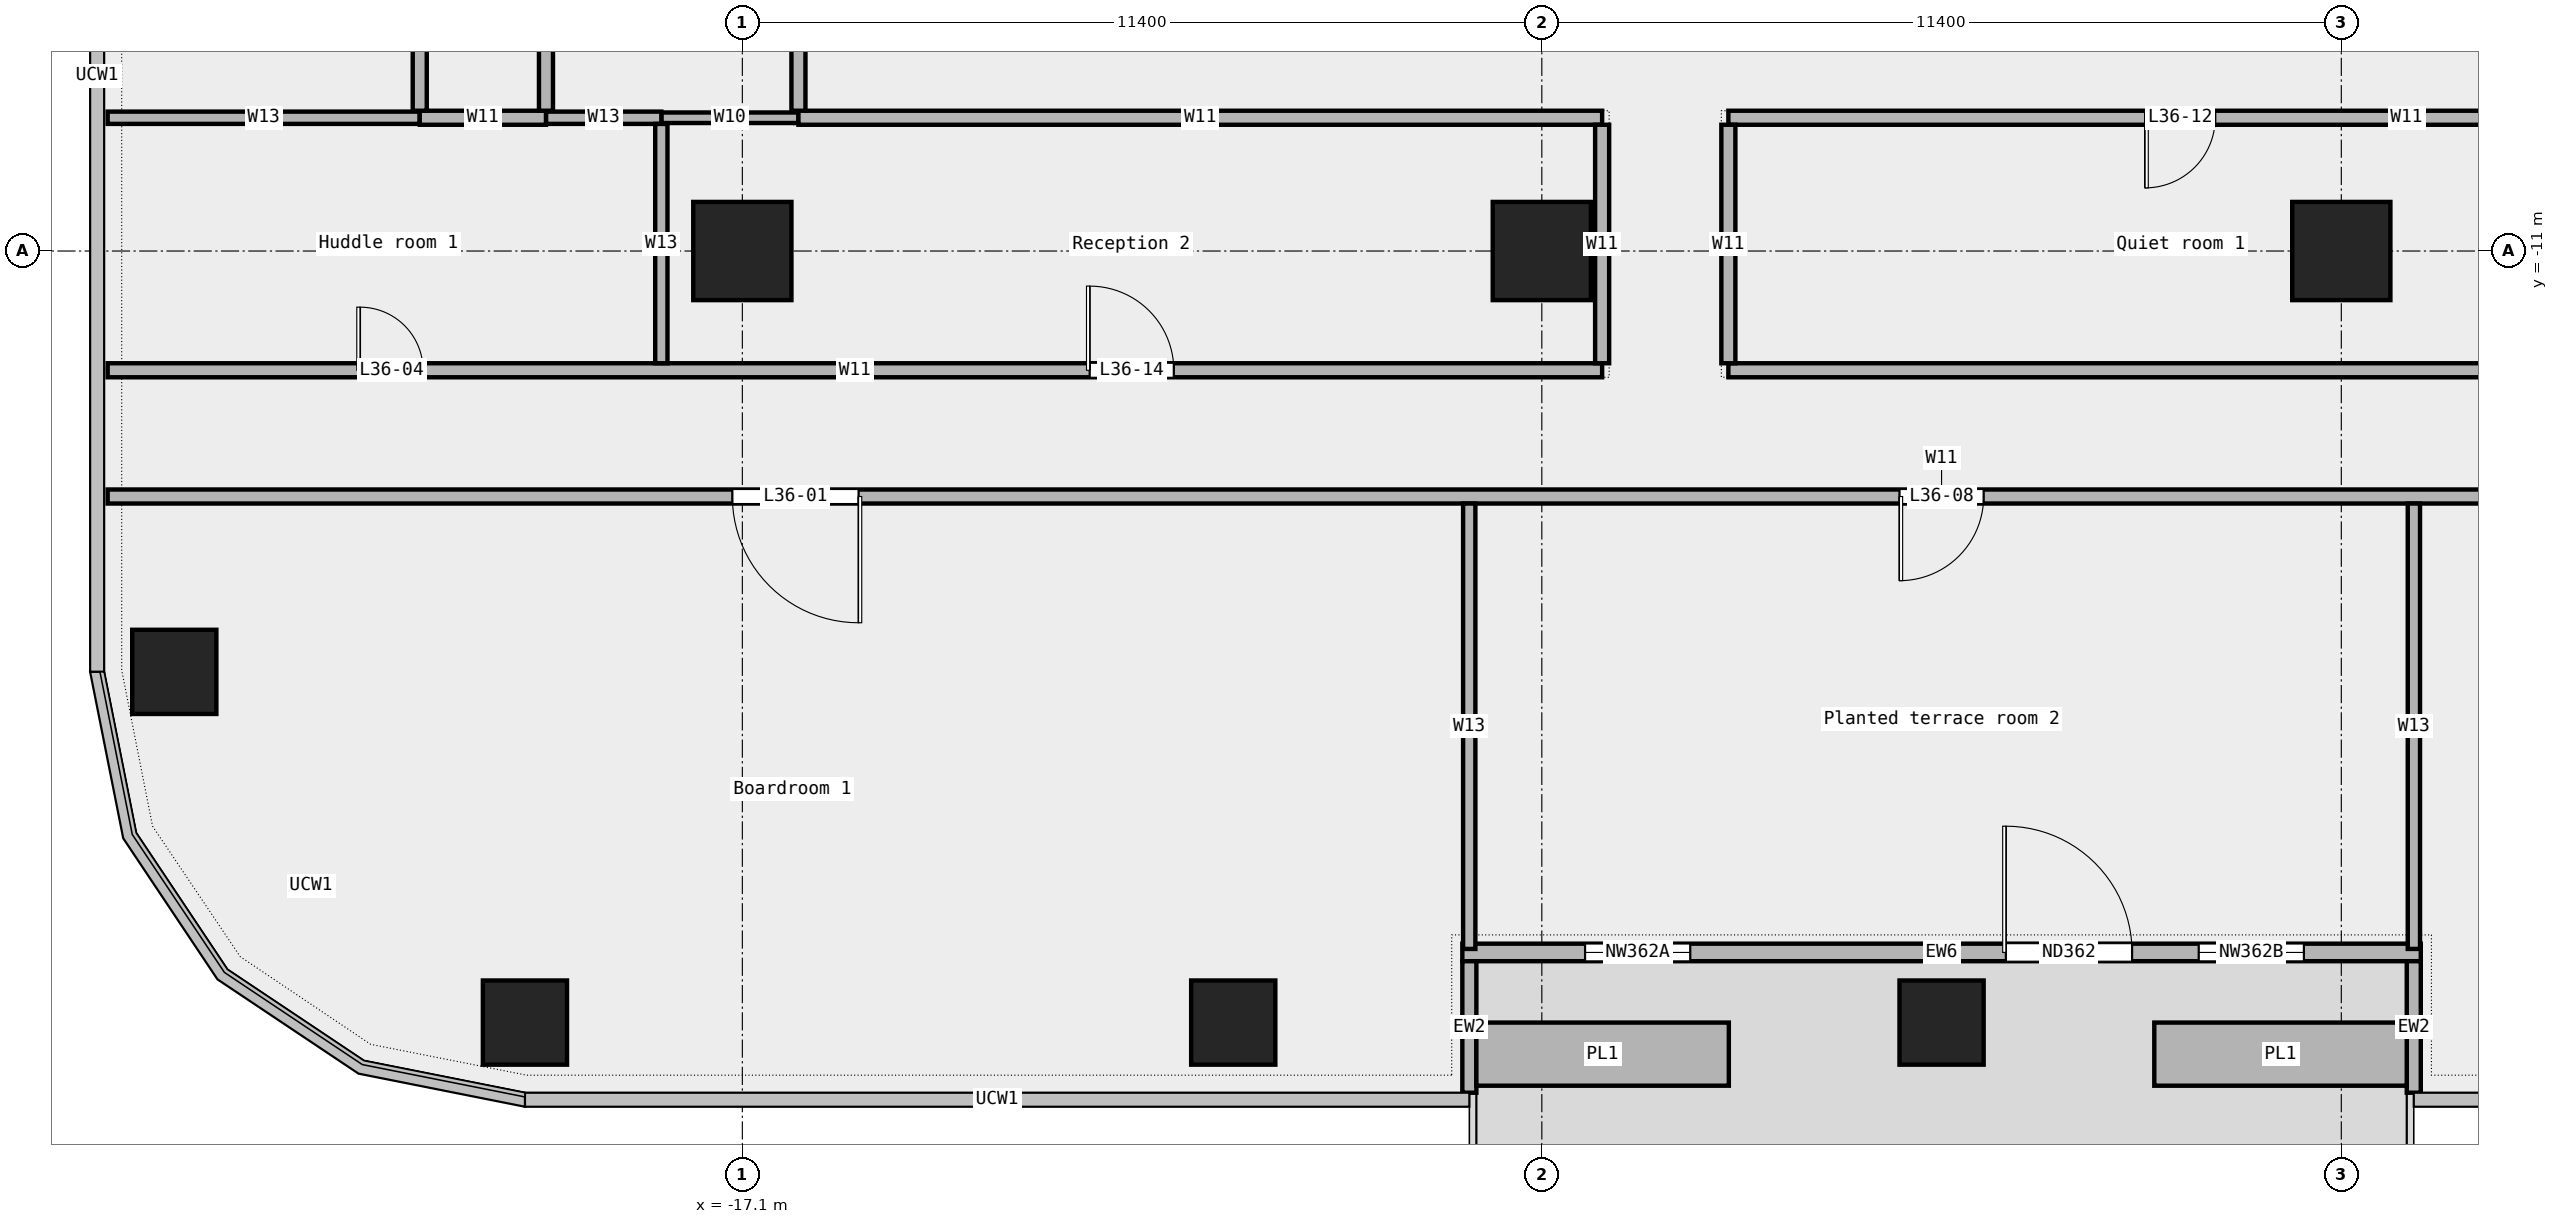
"""IFC4 building model, lengths in metres.
Left out: names, types, materials, properties, quantities, classifications, styles, units other than length and angle.
Written with IfcOpenShell. Run it as: python <this file> out.ifc"""

import sys

from ifc_helpers import new_model, si_unit, direction, frame, frame_2d, origin, origin_2d, place, context, subcontext, project, spatial, rectangle, extrude, element, fill, save


model = new_model("IFC4")
c1 = context("Model", 3, precision=1e-05, world=origin(), true_north=direction((0.0, 1.0)))
c2 = subcontext(c1, "Body", "Model", "MODEL_VIEW")
j1 = project(units=[si_unit("LENGTHUNIT", "METRE"), si_unit("PLANEANGLEUNIT", "RADIAN")], contexts=[c1])
p1 = place(None, origin())
s1 = spatial("IfcSite", under=j1, at=p1, CompositionType="ELEMENT")
p2 = place(p1, origin())
s2 = spatial("IfcBuilding", under=s1, at=p2, CompositionType="ELEMENT")
p3 = place(p2, frame((0.0, 0.0, 177.0)))
s3 = spatial("IfcBuildingStorey", under=s2, at=p3, CompositionType="ELEMENT", Elevation=177.0)
for number, where, z_axis, x_axis in (
    (1, (-20.2, -22.0, 0.0), (0.0, 0.0, 1.0), (1.0, 0.0, 0.0)),
    (2, (-10.1, -22.0, 0.0), (0.0, 0.0, 1.0), (1.0, 0.0, 0.0)),
    (3, (0.0, -22.0, 0.0), (0.0, 0.0, 1.0), (1.0, 0.0, 0.0)),
    (4, (-25.2, -17.0, 0.0), (0.0, 0.0, 1.0), (1.0, 0.0, 0.0)),
):
    element("IfcColumn", number, at=place(p3, frame(where, z_axis=z_axis, x_axis=x_axis)), inside=s3, PredefinedType="COLUMN", context=c2, shape_type="SweptSolid", body=[
        extrude(rectangle(XDim=1.2, YDim=1.2, at=origin_2d()), origin(), (0.0, 0.0, 1.0), 3.6),
    ])
for number, where, z_axis, x_axis in (
    (5, (-17.1, -11.0, 0.0), (0.0, 0.0, 1.0), (1.0, 0.0, 0.0)),
    (6, (-5.7, -11.0, 0.0), (0.0, 0.0, 1.0), (1.0, 0.0, 0.0)),
    (7, (5.7, -11.0, 0.0), (0.0, 0.0, 1.0), (1.0, 0.0, 0.0)),
):
    element("IfcColumn", number, at=place(p3, frame(where, z_axis=z_axis, x_axis=x_axis)), inside=s3, PredefinedType="COLUMN", context=c2, shape_type="SweptSolid", body=[
        extrude(rectangle(XDim=1.4, YDim=1.4, at=origin_2d()), origin(), (0.0, 0.0, 1.0), 3.6),
    ])
p4 = place(p3, frame((-6.833, -21.0, 0.0), z_axis=(0.0, 0.0, 1.0), x_axis=(1.0, 0.0, 0.0)))
e8 = element("IfcWall", 8, at=p4, inside=s3, PredefinedType="STANDARD", context=c2, shape_type="SweptSolid", body=[
    extrude(rectangle(XDim=13.667, YDim=0.25, at=frame_2d((6.833, 0.0))), origin(), (0.0, 0.0, 1.0), 3.6),
])
p5 = place(p4, frame((1.75, 0.0, 0.45)))
e9 = element("IfcOpeningElement", 9, at=p5, cuts=e8, PredefinedType="OPENING", context=c2, shape_type="SweptSolid", body=[
    extrude(rectangle(XDim=1.5, YDim=2.4, at=frame_2d((0.75, 1.2))), frame((0.0, 0.137, 0.0), z_axis=(0.0, -1.0, 0.0), x_axis=(1.0, 0.0, 0.0)), (0.0, 0.0, 1.0), 0.274),
])
p6 = place(p4, frame((7.75, 0.0, 0.0)))
e10 = element("IfcOpeningElement", 10, at=p6, cuts=e8, PredefinedType="OPENING", context=c2, shape_type="SweptSolid", body=[
    extrude(rectangle(XDim=1.8, YDim=2.4, at=frame_2d((0.9, 1.2))), frame((0.0, 0.137, 0.0), z_axis=(0.0, -1.0, 0.0), x_axis=(1.0, 0.0, 0.0)), (0.0, 0.0, 1.0), 0.274),
])
p7 = place(p4, frame((10.5, 0.0, 0.45)))
e11 = element("IfcOpeningElement", 11, at=p7, cuts=e8, PredefinedType="OPENING", context=c2, shape_type="SweptSolid", body=[
    extrude(rectangle(XDim=1.5, YDim=2.4, at=frame_2d((0.75, 1.2))), frame((0.0, 0.137, 0.0), z_axis=(0.0, -1.0, 0.0), x_axis=(1.0, 0.0, 0.0)), (0.0, 0.0, 1.0), 0.274),
])
for number, where, z_axis, x_axis in (
    (12, (-6.733, -23.0, 0.0), (0.0, 0.0, 1.0), (0.0, 1.0, 0.0)),
    (13, (6.733, -23.0, 0.0), (0.0, 0.0, 1.0), (0.0, 1.0, 0.0)),
):
    element("IfcWall", number, at=place(p3, frame(where, z_axis=z_axis, x_axis=x_axis)), inside=s3, PredefinedType="STANDARD", context=c2, shape_type="SweptSolid", body=[
        extrude(rectangle(XDim=1.875, YDim=0.2, at=frame_2d((0.938, 0.0))), origin(), (0.0, 0.0, 1.0), 3.6),
    ])
for number, where, z_axis, x_axis in (
    (14, (-6.633, -22.45, 0.0), (0.0, 0.0, 1.0), (1.0, 0.0, 0.0)),
    (15, (3.033, -22.45, 0.0), (0.0, 0.0, 1.0), (1.0, 0.0, 0.0)),
):
    element("IfcWall", number, at=place(p3, frame(where, z_axis=z_axis, x_axis=x_axis)), inside=s3, PredefinedType="STANDARD", context=c2, shape_type="SweptSolid", body=[
        extrude(rectangle(XDim=3.6, YDim=0.9, at=frame_2d((1.8, 0.0))), origin(), (0.0, 0.0, 1.0), 0.7),
    ])
p8 = place(p3, frame((-26.15, -14.5, 0.0), z_axis=(0.0, 0.0, 1.0), x_axis=(1.0, 0.0, 0.0)))
e16 = element("IfcWall", 16, at=p8, inside=s3, PredefinedType="PARTITIONING", context=c2, shape_type="SweptSolid", body=[
    extrude(rectangle(XDim=52.3, YDim=0.2, at=frame_2d((26.15, 0.0))), origin(), (0.0, 0.0, 1.0), 3.6),
])
p9 = place(p8, frame((8.907, 0.0, 0.0)))
e17 = element("IfcOpeningElement", 17, at=p9, cuts=e16, PredefinedType="OPENING", context=c2, shape_type="SweptSolid", body=[
    extrude(rectangle(XDim=1.8, YDim=2.1, at=frame_2d((0.9, 1.05))), frame((0.0, 0.112, 0.0), z_axis=(0.0, -1.0, 0.0), x_axis=(1.0, 0.0, 0.0)), (0.0, 0.0, 1.0), 0.224),
])
p10 = place(p8, frame((25.55, 0.0, 0.0)))
e18 = element("IfcOpeningElement", 18, at=p10, cuts=e16, PredefinedType="OPENING", context=c2, shape_type="SweptSolid", body=[
    extrude(rectangle(XDim=1.2, YDim=2.1, at=frame_2d((0.6, 1.05))), frame((0.0, 0.112, 0.0), z_axis=(0.0, -1.0, 0.0), x_axis=(1.0, 0.0, 0.0)), (0.0, 0.0, 1.0), 0.224),
])
p11 = place(p8, frame((41.593, 0.0, 0.0)))
e19 = element("IfcOpeningElement", 19, at=p11, cuts=e16, PredefinedType="OPENING", context=c2, shape_type="SweptSolid", body=[
    extrude(rectangle(XDim=1.8, YDim=2.1, at=frame_2d((0.9, 1.05))), frame((0.0, 0.112, 0.0), z_axis=(0.0, -1.0, 0.0), x_axis=(1.0, 0.0, 0.0)), (0.0, 0.0, 1.0), 0.224),
])
p12 = place(p3, frame((-26.15, -12.7, 0.0), z_axis=(0.0, 0.0, 1.0), x_axis=(1.0, 0.0, 0.0)))
e20 = element("IfcWall", 20, at=p12, inside=s3, PredefinedType="PARTITIONING", context=c2, shape_type="SweptSolid", body=[
    extrude(rectangle(XDim=21.31, YDim=0.2, at=frame_2d((10.655, 0.0))), origin(), (0.0, 0.0, 1.0), 3.6),
])
p13 = place(p12, frame((3.597, 0.0, 0.0)))
e21 = element("IfcOpeningElement", 21, at=p13, cuts=e20, PredefinedType="OPENING", context=c2, shape_type="SweptSolid", body=[
    extrude(rectangle(XDim=0.9, YDim=2.1, at=frame_2d((0.45, 1.05))), frame((0.0, 0.112, 0.0), z_axis=(0.0, -1.0, 0.0), x_axis=(1.0, 0.0, 0.0)), (0.0, 0.0, 1.0), 0.224),
])
p14 = place(p12, frame((14.002, 0.0, 0.0)))
e22 = element("IfcOpeningElement", 22, at=p14, cuts=e20, PredefinedType="OPENING", context=c2, shape_type="SweptSolid", body=[
    extrude(rectangle(XDim=1.2, YDim=2.1, at=frame_2d((0.6, 1.05))), frame((0.0, 0.112, 0.0), z_axis=(0.0, -1.0, 0.0), x_axis=(1.0, 0.0, 0.0)), (0.0, 0.0, 1.0), 0.224),
])
p15 = place(p3, frame((-3.04, -12.7, 0.0), z_axis=(0.0, 0.0, 1.0), x_axis=(1.0, 0.0, 0.0)))
e23 = element("IfcWall", 23, at=p15, inside=s3, PredefinedType="PARTITIONING", context=c2, shape_type="SweptSolid", body=[
    extrude(rectangle(XDim=29.19, YDim=0.2, at=frame_2d((14.595, 0.0))), origin(), (0.0, 0.0, 1.0), 3.6),
])
p16 = place(p15, frame((20.938, 0.0, 0.0)))
e24 = element("IfcOpeningElement", 24, at=p16, cuts=e23, PredefinedType="OPENING", context=c2, shape_type="SweptSolid", body=[
    extrude(rectangle(XDim=1.2, YDim=2.1, at=frame_2d((0.6, 1.05))), frame((0.0, 0.112, 0.0), z_axis=(0.0, -1.0, 0.0), x_axis=(1.0, 0.0, 0.0)), (0.0, 0.0, 1.0), 0.224),
])
p17 = place(p3, frame((-18.255, -9.1, 0.0), z_axis=(0.0, 0.0, 1.0), x_axis=(1.0, 0.0, 0.0)))
e25 = element("IfcWall", 25, at=p17, inside=s3, PredefinedType="PARTITIONING", context=c2, shape_type="SweptSolid", body=[
    extrude(rectangle(XDim=1.955, YDim=0.15, at=frame_2d((0.978, 0.0))), origin(), (0.0, 0.0, 1.0), 3.6),
])
p18 = place(p3, frame((-26.15, -9.1, 0.0), z_axis=(0.0, 0.0, 1.0), x_axis=(1.0, 0.0, 0.0)))
e26 = element("IfcWall", 26, at=p18, inside=s3, PredefinedType="PARTITIONING", context=c2, shape_type="SweptSolid", body=[
    extrude(rectangle(XDim=4.45, YDim=0.175, at=frame_2d((2.225, 0.0))), origin(), (0.0, 0.0, 1.0), 3.6),
])
p19 = place(p3, frame((-19.9, -9.1, 0.0), z_axis=(0.0, 0.0, 1.0), x_axis=(1.0, 0.0, 0.0)))
e27 = element("IfcWall", 27, at=p19, inside=s3, PredefinedType="PARTITIONING", context=c2, shape_type="SweptSolid", body=[
    extrude(rectangle(XDim=1.645, YDim=0.175, at=frame_2d((0.823, 0.0))), origin(), (0.0, 0.0, 1.0), 3.6),
])
p20 = place(p3, frame((-21.7, -9.1, 0.0), z_axis=(0.0, 0.0, 1.0), x_axis=(1.0, 0.0, 0.0)))
e28 = element("IfcWall", 28, at=p20, inside=s3, PredefinedType="PARTITIONING", context=c2, shape_type="SweptSolid", body=[
    extrude(rectangle(XDim=1.8, YDim=0.2, at=frame_2d((0.9, 0.0))), origin(), (0.0, 0.0, 1.0), 3.6),
])
p21 = place(p3, frame((-16.3, -9.1, 0.0), z_axis=(0.0, 0.0, 1.0), x_axis=(1.0, 0.0, 0.0)))
e29 = element("IfcWall", 29, at=p21, inside=s3, PredefinedType="PARTITIONING", context=c2, shape_type="SweptSolid", body=[
    extrude(rectangle(XDim=11.46, YDim=0.2, at=frame_2d((5.73, 0.0))), origin(), (0.0, 0.0, 1.0), 3.6),
])
p22 = place(p3, frame((-3.04, -9.1, 0.0), z_axis=(0.0, 0.0, 1.0), x_axis=(1.0, 0.0, 0.0)))
e30 = element("IfcWall", 30, at=p22, inside=s3, PredefinedType="PARTITIONING", context=c2, shape_type="SweptSolid", body=[
    extrude(rectangle(XDim=19.34, YDim=0.2, at=frame_2d((9.67, 0.0))), origin(), (0.0, 0.0, 1.0), 3.6),
])
p23 = place(p22, frame((5.942, 0.0, 0.0)))
e31 = element("IfcOpeningElement", 31, at=p23, cuts=e30, PredefinedType="OPENING", context=c2, shape_type="SweptSolid", body=[
    extrude(rectangle(XDim=1.0, YDim=2.1, at=frame_2d((0.5, 1.05))), frame((0.0, 0.112, 0.0), z_axis=(0.0, -1.0, 0.0), x_axis=(1.0, 0.0, 0.0)), (0.0, 0.0, 1.0), 0.224),
])
p24 = place(p3, frame((-21.7, -9.0, 0.0), z_axis=(0.0, 0.0, 1.0), x_axis=(0.0, 1.0, 0.0)))
e32 = element("IfcWall", 32, at=p24, inside=s3, PredefinedType="PARTITIONING", context=c2, shape_type="SweptSolid", body=[
    extrude(rectangle(XDim=24.3, YDim=0.2, at=frame_2d((12.15, 0.0))), origin(), (0.0, 0.0, 1.0), 3.6),
])
p25 = place(p24, frame((14.925, 0.0, 0.0)))
e33 = element("IfcOpeningElement", 33, at=p25, cuts=e32, PredefinedType="OPENING", context=c2, shape_type="SweptSolid", body=[
    extrude(rectangle(XDim=0.9, YDim=2.1, at=frame_2d((0.45, 1.05))), frame((0.0, 0.112, 0.0), z_axis=(0.0, -1.0, 0.0), x_axis=(1.0, 0.0, 0.0)), (0.0, 0.0, 1.0), 0.224),
])
p26 = place(p24, frame((2.562, 0.0, 0.0)))
e34 = element("IfcOpeningElement", 34, at=p26, cuts=e32, PredefinedType="OPENING", context=c2, shape_type="SweptSolid", body=[
    extrude(rectangle(XDim=0.9, YDim=2.1, at=frame_2d((0.45, 1.05))), frame((0.0, 0.112, 0.0), z_axis=(0.0, -1.0, 0.0), x_axis=(1.0, 0.0, 0.0)), (0.0, 0.0, 1.0), 0.224),
])
p27 = place(p3, frame((-19.9, -9.0, 0.0), z_axis=(0.0, 0.0, 1.0), x_axis=(0.0, 1.0, 0.0)))
e35 = element("IfcWall", 35, at=p27, inside=s3, PredefinedType="PARTITIONING", context=c2, shape_type="SweptSolid", body=[
    extrude(rectangle(XDim=13.6, YDim=0.2, at=frame_2d((6.8, 0.0))), origin(), (0.0, 0.0, 1.0), 3.6),
])
p28 = place(p3, frame((-18.255, -12.6, 0.0), z_axis=(0.0, 0.0, 1.0), x_axis=(0.0, 1.0, 0.0)))
e36 = element("IfcWall", 36, at=p28, inside=s3, PredefinedType="PARTITIONING", context=c2, shape_type="SweptSolid", body=[
    extrude(rectangle(XDim=3.412, YDim=0.175, at=frame_2d((1.706, 0.0))), origin(), (0.0, 0.0, 1.0), 3.6),
])
p29 = place(p3, frame((-16.3, -9.0, 0.0), z_axis=(0.0, 0.0, 1.0), x_axis=(0.0, 1.0, 0.0)))
e37 = element("IfcWall", 37, at=p29, inside=s3, PredefinedType="PARTITIONING", context=c2, shape_type="SweptSolid", body=[
    extrude(rectangle(XDim=8.3, YDim=0.2, at=frame_2d((4.15, 0.0))), origin(), (0.0, 0.0, 1.0), 3.6),
])
p30 = place(p29, frame((3.442, 0.0, 0.0)))
e38 = element("IfcOpeningElement", 38, at=p30, cuts=e37, PredefinedType="OPENING", context=c2, shape_type="SweptSolid", body=[
    extrude(rectangle(XDim=0.9, YDim=2.1, at=frame_2d((0.45, 1.05))), frame((0.0, 0.112, 0.0), z_axis=(0.0, -1.0, 0.0), x_axis=(1.0, 0.0, 0.0)), (0.0, 0.0, 1.0), 0.224),
])
p31 = place(p3, frame((-6.735, -20.95, 0.0), z_axis=(0.0, 0.0, 1.0), x_axis=(0.0, 1.0, 0.0)))
e39 = element("IfcWall", 39, at=p31, inside=s3, PredefinedType="PARTITIONING", context=c2, shape_type="SweptSolid", body=[
    extrude(rectangle(XDim=6.35, YDim=0.175, at=frame_2d((3.175, 0.0))), origin(), (0.0, 0.0, 1.0), 3.6),
])
for number, where, z_axis, x_axis in (
    (40, (-4.84, -12.6, 0.0), (0.0, 0.0, 1.0), (0.0, 1.0, 0.0)),
    (41, (-3.04, -12.6, 0.0), (0.0, 0.0, 1.0), (0.0, 1.0, 0.0)),
):
    element("IfcWall", number, at=place(p3, frame(where, z_axis=z_axis, x_axis=x_axis)), inside=s3, PredefinedType="PARTITIONING", context=c2, shape_type="SweptSolid", body=[
        extrude(rectangle(XDim=3.4, YDim=0.2, at=frame_2d((1.7, 0.0))), origin(), (0.0, 0.0, 1.0), 3.6),
    ])
p32 = place(p3, frame((6.735, -20.95, 0.0), z_axis=(0.0, 0.0, 1.0), x_axis=(0.0, 1.0, 0.0)))
e42 = element("IfcWall", 42, at=p32, inside=s3, PredefinedType="PARTITIONING", context=c2, shape_type="SweptSolid", body=[
    extrude(rectangle(XDim=6.35, YDim=0.175, at=frame_2d((3.175, 0.0))), origin(), (0.0, 0.0, 1.0), 3.6),
])
p33 = place(p5, origin())
e43 = element("IfcWindow", 43, at=p33, inside=s3, PartitioningType="SINGLE_PANEL", PredefinedType="WINDOW", context=c2, shape_type="SweptSolid", body=[
    extrude(rectangle(XDim=1.5, YDim=2.4, at=frame_2d((0.75, 1.2))), frame((0.0, 0.03, 0.0), z_axis=(0.0, -1.0, 0.0), x_axis=(1.0, 0.0, 0.0)), (0.0, 0.0, 1.0), 0.06),
])
fill(e9, e43)
p34 = place(p6, origin())
e44 = element("IfcDoor", 44, at=p34, inside=s3, OperationType="DOUBLE_DOOR_SINGLE_SWING", PredefinedType="DOOR", context=c2, shape_type="SweptSolid", body=[
    extrude(rectangle(XDim=1.8, YDim=2.4, at=frame_2d((0.9, 1.2))), frame((0.0, 0.025, 0.0), z_axis=(0.0, -1.0, 0.0), x_axis=(1.0, 0.0, 0.0)), (0.0, 0.0, 1.0), 0.05),
])
fill(e10, e44)
p35 = place(p7, origin())
e45 = element("IfcWindow", 45, at=p35, inside=s3, PartitioningType="SINGLE_PANEL", PredefinedType="WINDOW", context=c2, shape_type="SweptSolid", body=[
    extrude(rectangle(XDim=1.5, YDim=2.4, at=frame_2d((0.75, 1.2))), frame((0.0, 0.03, 0.0), z_axis=(0.0, -1.0, 0.0), x_axis=(1.0, 0.0, 0.0)), (0.0, 0.0, 1.0), 0.06),
])
fill(e11, e45)
p36 = place(p9, origin())
e46 = element("IfcDoor", 46, at=p36, inside=s3, OperationType="DOUBLE_DOOR_SINGLE_SWING", PredefinedType="DOOR", context=c2, shape_type="SweptSolid", body=[
    extrude(rectangle(XDim=1.8, YDim=2.1, at=frame_2d((0.9, 1.05))), frame((0.0, 0.025, 0.0), z_axis=(0.0, -1.0, 0.0), x_axis=(1.0, 0.0, 0.0)), (0.0, 0.0, 1.0), 0.05),
])
fill(e17, e46)
p37 = place(p13, origin())
e47 = element("IfcDoor", 47, at=p37, inside=s3, OperationType="SINGLE_SWING_LEFT", PredefinedType="DOOR", context=c2, shape_type="SweptSolid", body=[
    extrude(rectangle(XDim=0.9, YDim=2.1, at=frame_2d((0.45, 1.05))), frame((0.0, 0.025, 0.0), z_axis=(0.0, -1.0, 0.0), x_axis=(1.0, 0.0, 0.0)), (0.0, 0.0, 1.0), 0.05),
])
fill(e21, e47)
p38 = place(p10, origin())
e48 = element("IfcDoor", 48, at=p38, inside=s3, OperationType="SINGLE_SWING_RIGHT", PredefinedType="DOOR", context=c2, shape_type="SweptSolid", body=[
    extrude(rectangle(XDim=1.2, YDim=2.1, at=frame_2d((0.6, 1.05))), frame((0.0, 0.025, 0.0), z_axis=(0.0, -1.0, 0.0), x_axis=(1.0, 0.0, 0.0)), (0.0, 0.0, 1.0), 0.05),
])
fill(e18, e48)
p39 = place(p23, origin())
e49 = element("IfcDoor", 49, at=p39, inside=s3, OperationType="SINGLE_SWING_RIGHT", PredefinedType="DOOR", context=c2, shape_type="SweptSolid", body=[
    extrude(rectangle(XDim=1.0, YDim=2.1, at=frame_2d((0.5, 1.05))), frame((0.0, 0.025, 0.0), z_axis=(0.0, -1.0, 0.0), x_axis=(1.0, 0.0, 0.0)), (0.0, 0.0, 1.0), 0.05),
])
fill(e31, e49)
p40 = place(p14, origin())
e50 = element("IfcDoor", 50, at=p40, inside=s3, OperationType="SINGLE_SWING_LEFT", PredefinedType="DOOR", context=c2, shape_type="SweptSolid", body=[
    extrude(rectangle(XDim=1.2, YDim=2.1, at=frame_2d((0.6, 1.05))), frame((0.0, 0.025, 0.0), z_axis=(0.0, -1.0, 0.0), x_axis=(1.0, 0.0, 0.0)), (0.0, 0.0, 1.0), 0.05),
])
fill(e22, e50)
save(model, sys.argv[1])
